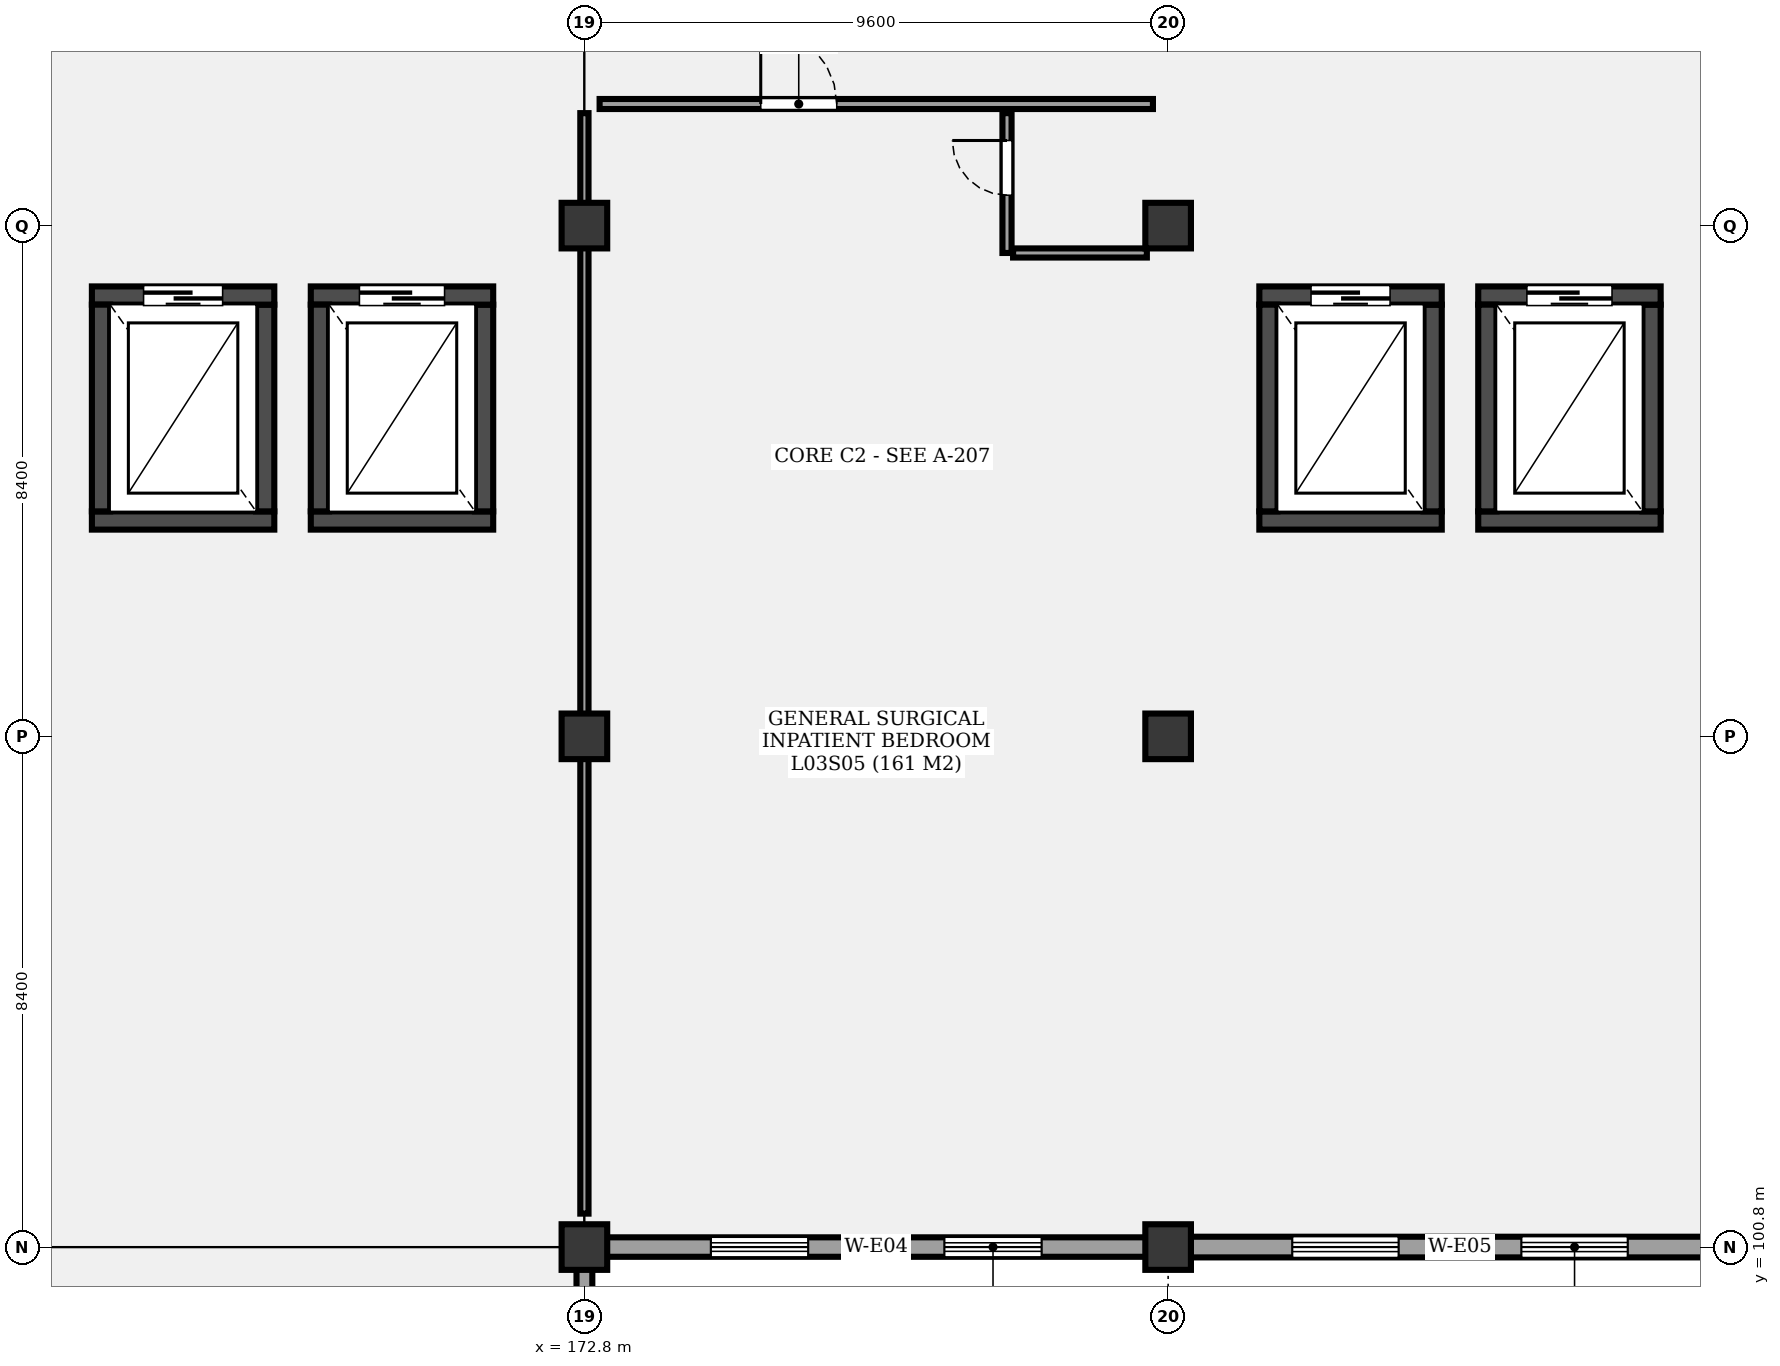
"""IFC4 building model, lengths in metres.
Left out: names, types, materials, properties, quantities, classifications, styles, units other than length and angle.
Written with IfcOpenShell. Run it as: python <this file> out.ifc"""

import sys

from ifc_helpers import new_model, si_unit, direction, frame, frame_2d, origin, origin_2d, place, context, subcontext, project, spatial, rectangle, extrude, element, fill, save


model = new_model("IFC4")
c1 = context("Model", 3, precision=1e-05, world=origin(), true_north=direction((0.0, 1.0)))
c2 = subcontext(c1, "Body", "Model", "MODEL_VIEW")
j1 = project(units=[si_unit("LENGTHUNIT", "METRE"), si_unit("PLANEANGLEUNIT", "RADIAN")], contexts=[c1])
p1 = place(None, origin())
s1 = spatial("IfcSite", under=j1, at=p1, CompositionType="ELEMENT")
p2 = place(p1, origin())
s2 = spatial("IfcBuilding", under=s1, at=p2, CompositionType="ELEMENT")
p3 = place(p2, frame((0.0, 0.0, 13.5)))
s3 = spatial("IfcBuildingStorey", under=s2, at=p3, CompositionType="ELEMENT", Elevation=13.5)
for number, where, z_axis, x_axis in (
    (1, (172.8, 100.8, 0.0), (0.0, 0.0, 1.0), (1.0, 0.0, 0.0)),
    (2, (172.8, 109.2, 0.0), (0.0, 0.0, 1.0), (1.0, 0.0, 0.0)),
    (3, (172.8, 117.6, 0.0), (0.0, 0.0, 1.0), (1.0, 0.0, 0.0)),
    (4, (182.4, 100.8, 0.0), (0.0, 0.0, 1.0), (1.0, 0.0, 0.0)),
    (5, (182.4, 109.2, 0.0), (0.0, 0.0, 1.0), (1.0, 0.0, 0.0)),
    (6, (182.4, 117.6, 0.0), (0.0, 0.0, 1.0), (1.0, 0.0, 0.0)),
):
    element("IfcColumn", number, at=place(p3, frame(where, z_axis=z_axis, x_axis=x_axis)), inside=s3, PredefinedType="COLUMN", context=c2, shape_type="SweptSolid", body=[
        extrude(rectangle(XDim=0.75, YDim=0.75, at=origin_2d()), origin(), (0.0, 0.0, 1.0), 4.3),
    ])
p4 = place(p3, frame((164.7, 112.75, 0.0), z_axis=(0.0, 0.0, 1.0), x_axis=(1.0, 0.0, 0.0)))
e7 = element("IfcWall", 7, at=p4, inside=s3, PredefinedType="SHEAR", context=c2, shape_type="SweptSolid", body=[
    extrude(rectangle(XDim=3.0, YDim=0.3, at=frame_2d((1.5, 0.0))), origin(), (0.0, 0.0, 1.0), 4.3),
])
p5 = place(p3, frame((167.55, 112.9, 0.0), z_axis=(0.0, 0.0, 1.0), x_axis=(0.0, 1.0, 0.0)))
e8 = element("IfcWall", 8, at=p5, inside=s3, PredefinedType="SHEAR", context=c2, shape_type="SweptSolid", body=[
    extrude(rectangle(XDim=3.4, YDim=0.3, at=frame_2d((1.7, 0.0))), origin(), (0.0, 0.0, 1.0), 4.3),
])
p6 = place(p3, frame((167.7, 116.45, 0.0), z_axis=(0.0, 0.0, 1.0), x_axis=(-1.0, 0.0, 0.0)))
e9 = element("IfcWall", 9, at=p6, inside=s3, PredefinedType="SHEAR", context=c2, shape_type="SweptSolid", body=[
    extrude(rectangle(XDim=3.0, YDim=0.3, at=frame_2d((1.5, 0.0))), origin(), (0.0, 0.0, 1.0), 4.3),
])
p7 = place(p6, frame((0.85, 0.0, 0.0)))
e10 = element("IfcOpeningElement", 10, at=p7, cuts=e9, PredefinedType="OPENING", context=c2, shape_type="SweptSolid", body=[
    extrude(rectangle(XDim=1.3, YDim=2.3, at=frame_2d((0.65, 1.15))), frame((0.0, 0.16, 0.0), z_axis=(0.0, -1.0, 0.0), x_axis=(1.0, 0.0, 0.0)), (0.0, 0.0, 1.0), 0.32),
])
p8 = place(p3, frame((164.85, 116.3, 0.0), z_axis=(0.0, 0.0, 1.0), x_axis=(0.0, -1.0, 0.0)))
e11 = element("IfcWall", 11, at=p8, inside=s3, PredefinedType="SHEAR", context=c2, shape_type="SweptSolid", body=[
    extrude(rectangle(XDim=3.4, YDim=0.3, at=frame_2d((1.7, 0.0))), origin(), (0.0, 0.0, 1.0), 4.3),
])
p9 = place(p3, frame((168.3, 112.75, 0.0), z_axis=(0.0, 0.0, 1.0), x_axis=(1.0, 0.0, 0.0)))
e12 = element("IfcWall", 12, at=p9, inside=s3, PredefinedType="SHEAR", context=c2, shape_type="SweptSolid", body=[
    extrude(rectangle(XDim=3.0, YDim=0.3, at=frame_2d((1.5, 0.0))), origin(), (0.0, 0.0, 1.0), 4.3),
])
p10 = place(p3, frame((171.15, 112.9, 0.0), z_axis=(0.0, 0.0, 1.0), x_axis=(0.0, 1.0, 0.0)))
e13 = element("IfcWall", 13, at=p10, inside=s3, PredefinedType="SHEAR", context=c2, shape_type="SweptSolid", body=[
    extrude(rectangle(XDim=3.4, YDim=0.3, at=frame_2d((1.7, 0.0))), origin(), (0.0, 0.0, 1.0), 4.3),
])
p11 = place(p3, frame((171.3, 116.45, 0.0), z_axis=(0.0, 0.0, 1.0), x_axis=(-1.0, 0.0, 0.0)))
e14 = element("IfcWall", 14, at=p11, inside=s3, PredefinedType="SHEAR", context=c2, shape_type="SweptSolid", body=[
    extrude(rectangle(XDim=3.0, YDim=0.3, at=frame_2d((1.5, 0.0))), origin(), (0.0, 0.0, 1.0), 4.3),
])
p12 = place(p11, frame((0.8, 0.0, 0.0)))
e15 = element("IfcOpeningElement", 15, at=p12, cuts=e14, PredefinedType="OPENING", context=c2, shape_type="SweptSolid", body=[
    extrude(rectangle(XDim=1.4, YDim=2.3, at=frame_2d((0.7, 1.15))), frame((0.0, 0.16, 0.0), z_axis=(0.0, -1.0, 0.0), x_axis=(1.0, 0.0, 0.0)), (0.0, 0.0, 1.0), 0.32),
])
p13 = place(p3, frame((168.45, 116.3, 0.0), z_axis=(0.0, 0.0, 1.0), x_axis=(0.0, -1.0, 0.0)))
e16 = element("IfcWall", 16, at=p13, inside=s3, PredefinedType="SHEAR", context=c2, shape_type="SweptSolid", body=[
    extrude(rectangle(XDim=3.4, YDim=0.3, at=frame_2d((1.7, 0.0))), origin(), (0.0, 0.0, 1.0), 4.3),
])
p14 = place(p3, frame((183.9, 112.75, 0.0), z_axis=(0.0, 0.0, 1.0), x_axis=(1.0, 0.0, 0.0)))
e17 = element("IfcWall", 17, at=p14, inside=s3, PredefinedType="SHEAR", context=c2, shape_type="SweptSolid", body=[
    extrude(rectangle(XDim=3.0, YDim=0.3, at=frame_2d((1.5, 0.0))), origin(), (0.0, 0.0, 1.0), 4.3),
])
p15 = place(p3, frame((186.75, 112.9, 0.0), z_axis=(0.0, 0.0, 1.0), x_axis=(0.0, 1.0, 0.0)))
e18 = element("IfcWall", 18, at=p15, inside=s3, PredefinedType="SHEAR", context=c2, shape_type="SweptSolid", body=[
    extrude(rectangle(XDim=3.4, YDim=0.3, at=frame_2d((1.7, 0.0))), origin(), (0.0, 0.0, 1.0), 4.3),
])
p16 = place(p3, frame((186.9, 116.45, 0.0), z_axis=(0.0, 0.0, 1.0), x_axis=(-1.0, 0.0, 0.0)))
e19 = element("IfcWall", 19, at=p16, inside=s3, PredefinedType="SHEAR", context=c2, shape_type="SweptSolid", body=[
    extrude(rectangle(XDim=3.0, YDim=0.3, at=frame_2d((1.5, 0.0))), origin(), (0.0, 0.0, 1.0), 4.3),
])
p17 = place(p16, frame((0.85, 0.0, 0.0)))
e20 = element("IfcOpeningElement", 20, at=p17, cuts=e19, PredefinedType="OPENING", context=c2, shape_type="SweptSolid", body=[
    extrude(rectangle(XDim=1.3, YDim=2.3, at=frame_2d((0.65, 1.15))), frame((0.0, 0.16, 0.0), z_axis=(0.0, -1.0, 0.0), x_axis=(1.0, 0.0, 0.0)), (0.0, 0.0, 1.0), 0.32),
])
p18 = place(p3, frame((184.05, 116.3, 0.0), z_axis=(0.0, 0.0, 1.0), x_axis=(0.0, -1.0, 0.0)))
e21 = element("IfcWall", 21, at=p18, inside=s3, PredefinedType="SHEAR", context=c2, shape_type="SweptSolid", body=[
    extrude(rectangle(XDim=3.4, YDim=0.3, at=frame_2d((1.7, 0.0))), origin(), (0.0, 0.0, 1.0), 4.3),
])
p19 = place(p3, frame((187.5, 112.75, 0.0), z_axis=(0.0, 0.0, 1.0), x_axis=(1.0, 0.0, 0.0)))
e22 = element("IfcWall", 22, at=p19, inside=s3, PredefinedType="SHEAR", context=c2, shape_type="SweptSolid", body=[
    extrude(rectangle(XDim=3.0, YDim=0.3, at=frame_2d((1.5, 0.0))), origin(), (0.0, 0.0, 1.0), 4.3),
])
p20 = place(p3, frame((190.35, 112.9, 0.0), z_axis=(0.0, 0.0, 1.0), x_axis=(0.0, 1.0, 0.0)))
e23 = element("IfcWall", 23, at=p20, inside=s3, PredefinedType="SHEAR", context=c2, shape_type="SweptSolid", body=[
    extrude(rectangle(XDim=3.4, YDim=0.3, at=frame_2d((1.7, 0.0))), origin(), (0.0, 0.0, 1.0), 4.3),
])
p21 = place(p3, frame((190.5, 116.45, 0.0), z_axis=(0.0, 0.0, 1.0), x_axis=(-1.0, 0.0, 0.0)))
e24 = element("IfcWall", 24, at=p21, inside=s3, PredefinedType="SHEAR", context=c2, shape_type="SweptSolid", body=[
    extrude(rectangle(XDim=3.0, YDim=0.3, at=frame_2d((1.5, 0.0))), origin(), (0.0, 0.0, 1.0), 4.3),
])
p22 = place(p21, frame((0.8, 0.0, 0.0)))
e25 = element("IfcOpeningElement", 25, at=p22, cuts=e24, PredefinedType="OPENING", context=c2, shape_type="SweptSolid", body=[
    extrude(rectangle(XDim=1.4, YDim=2.3, at=frame_2d((0.7, 1.15))), frame((0.0, 0.16, 0.0), z_axis=(0.0, -1.0, 0.0), x_axis=(1.0, 0.0, 0.0)), (0.0, 0.0, 1.0), 0.32),
])
p23 = place(p3, frame((187.65, 116.3, 0.0), z_axis=(0.0, 0.0, 1.0), x_axis=(0.0, -1.0, 0.0)))
e26 = element("IfcWall", 26, at=p23, inside=s3, PredefinedType="SHEAR", context=c2, shape_type="SweptSolid", body=[
    extrude(rectangle(XDim=3.4, YDim=0.3, at=frame_2d((1.7, 0.0))), origin(), (0.0, 0.0, 1.0), 4.3),
])
p24 = place(p3, frame((182.4, 100.8, 0.0), z_axis=(0.0, 0.0, 1.0), x_axis=(-1.0, 0.0, 0.0)))
e27 = element("IfcWall", 27, at=p24, inside=s3, PredefinedType="SOLIDWALL", context=c2, shape_type="SweptSolid", body=[
    extrude(rectangle(XDim=9.6, YDim=0.32, at=frame_2d((4.8, 0.0))), origin(), (0.0, 0.0, 1.0), 3.49),
])
p25 = place(p24, frame((2.08, 0.0, 0.85)))
e28 = element("IfcOpeningElement", 28, at=p25, cuts=e27, PredefinedType="OPENING", context=c2, shape_type="SweptSolid", body=[
    extrude(rectangle(XDim=1.6, YDim=1.2, at=frame_2d((0.8, 0.6))), frame((0.0, 0.17, 0.0), z_axis=(0.0, -1.0, 0.0), x_axis=(1.0, 0.0, 0.0)), (0.0, 0.0, 1.0), 0.34),
])
p26 = place(p24, frame((5.92, 0.0, 0.85)))
e29 = element("IfcOpeningElement", 29, at=p26, cuts=e27, PredefinedType="OPENING", context=c2, shape_type="SweptSolid", body=[
    extrude(rectangle(XDim=1.6, YDim=1.2, at=frame_2d((0.8, 0.6))), frame((0.0, 0.17, 0.0), z_axis=(0.0, -1.0, 0.0), x_axis=(1.0, 0.0, 0.0)), (0.0, 0.0, 1.0), 0.34),
])
p27 = place(p3, frame((192.0, 100.8, 0.0), z_axis=(0.0, 0.0, 1.0), x_axis=(-1.0, 0.0, 0.0)))
e30 = element("IfcWall", 30, at=p27, inside=s3, PredefinedType="SOLIDWALL", context=c2, shape_type="SweptSolid", body=[
    extrude(rectangle(XDim=9.6, YDim=0.34, at=frame_2d((4.8, 0.0))), origin(), (0.0, 0.0, 1.0), 3.49),
])
p28 = place(p27, frame((2.041, 0.0, 0.85)))
e31 = element("IfcOpeningElement", 31, at=p28, cuts=e30, PredefinedType="OPENING", context=c2, shape_type="SweptSolid", body=[
    extrude(rectangle(XDim=1.75, YDim=1.2, at=frame_2d((0.875, 0.6))), frame((0.0, 0.18, 0.0), z_axis=(0.0, -1.0, 0.0), x_axis=(1.0, 0.0, 0.0)), (0.0, 0.0, 1.0), 0.36),
])
p29 = place(p27, frame((5.809, 0.0, 0.85)))
e32 = element("IfcOpeningElement", 32, at=p29, cuts=e30, PredefinedType="OPENING", context=c2, shape_type="SweptSolid", body=[
    extrude(rectangle(XDim=1.75, YDim=1.2, at=frame_2d((0.875, 0.6))), frame((0.0, 0.18, 0.0), z_axis=(0.0, -1.0, 0.0), x_axis=(1.0, 0.0, 0.0)), (0.0, 0.0, 1.0), 0.36),
])
p30 = place(p3, frame((172.8, 100.64, 0.0), z_axis=(0.0, 0.0, 1.0), x_axis=(0.0, -1.0, 0.0)))
e33 = element("IfcWall", 33, at=p30, inside=s3, PredefinedType="SOLIDWALL", context=c2, shape_type="SweptSolid", body=[
    extrude(rectangle(XDim=8.24, YDim=0.26, at=frame_2d((4.12, 0.0))), origin(), (0.0, 0.0, 1.0), 3.49),
])
p31 = place(p30, frame((3.095, 0.0, 0.85)))
e34 = element("IfcOpeningElement", 34, at=p31, cuts=e33, PredefinedType="OPENING", context=c2, shape_type="SweptSolid", body=[
    extrude(rectangle(XDim=2.05, YDim=1.2, at=frame_2d((1.025, 0.6))), frame((0.0, 0.14, 0.0), z_axis=(0.0, -1.0, 0.0), x_axis=(1.0, 0.0, 0.0)), (0.0, 0.0, 1.0), 0.28),
])
p32 = place(p3, frame((173.05, 119.6, 0.0), z_axis=(0.0, 0.0, 1.0), x_axis=(1.0, 0.0, 0.0)))
e35 = element("IfcWall", 35, at=p32, inside=s3, PredefinedType="PARTITIONING", context=c2, shape_type="SweptSolid", body=[
    extrude(rectangle(XDim=9.1, YDim=0.165, at=frame_2d((4.55, 0.0))), origin(), (0.0, 0.0, 1.0), 3.4),
])
p33 = place(p32, frame((2.65, 0.0, 0.0)))
e36 = element("IfcOpeningElement", 36, at=p33, cuts=e35, PredefinedType="OPENING", context=c2, shape_type="SweptSolid", body=[
    extrude(rectangle(XDim=1.25, YDim=2.2, at=frame_2d((0.625, 1.1))), frame((0.0, 0.093, 0.0), z_axis=(0.0, -1.0, 0.0), x_axis=(1.0, 0.0, 0.0)), (0.0, 0.0, 1.0), 0.185),
])
p34 = place(p3, frame((179.75, 117.15, 0.0), z_axis=(0.0, 0.0, 1.0), x_axis=(0.0, 1.0, 0.0)))
e37 = element("IfcWall", 37, at=p34, inside=s3, PredefinedType="PARTITIONING", context=c2, shape_type="SweptSolid", body=[
    extrude(rectangle(XDim=2.3, YDim=0.15, at=frame_2d((1.15, 0.0))), origin(), (0.0, 0.0, 1.0), 3.4),
])
p35 = place(p34, frame((0.95, 0.0, 0.0)))
e38 = element("IfcOpeningElement", 38, at=p35, cuts=e37, PredefinedType="OPENING", context=c2, shape_type="SweptSolid", body=[
    extrude(rectangle(XDim=0.9, YDim=2.1, at=frame_2d((0.45, 1.05))), frame((0.0, 0.085, 0.0), z_axis=(0.0, -1.0, 0.0), x_axis=(1.0, 0.0, 0.0)), (0.0, 0.0, 1.0), 0.17),
])
p36 = place(p3, frame((179.85, 117.15, 0.0), z_axis=(0.0, 0.0, 1.0), x_axis=(1.0, 0.0, 0.0)))
e39 = element("IfcWall", 39, at=p36, inside=s3, PredefinedType="PARTITIONING", context=c2, shape_type="SweptSolid", body=[
    extrude(rectangle(XDim=2.2, YDim=0.15, at=frame_2d((1.1, 0.0))), origin(), (0.0, 0.0, 1.0), 3.4),
])
p37 = place(p3, frame((172.8, 101.35, 0.0), z_axis=(0.0, 0.0, 1.0), x_axis=(0.0, 1.0, 0.0)))
e40 = element("IfcWall", 40, at=p37, inside=s3, PredefinedType="PARTITIONING", context=c2, shape_type="SweptSolid", body=[
    extrude(rectangle(XDim=18.1, YDim=0.135, at=frame_2d((9.05, 0.0))), origin(), (0.0, 0.0, 1.0), 3.4),
])
p38 = place(p7, origin())
e41 = element("IfcDoor", 41, at=p38, inside=s3, OperationType="SLIDING_TO_RIGHT", PredefinedType="DOOR", context=c2, shape_type="SweptSolid", body=[
    extrude(rectangle(XDim=1.3, YDim=2.3, at=frame_2d((0.65, 1.15))), frame((0.0, 0.025, 0.0), z_axis=(0.0, -1.0, 0.0), x_axis=(1.0, 0.0, 0.0)), (0.0, 0.0, 1.0), 0.05),
])
fill(e10, e41)
p39 = place(p12, origin())
e42 = element("IfcDoor", 42, at=p39, inside=s3, OperationType="SLIDING_TO_LEFT", PredefinedType="DOOR", context=c2, shape_type="SweptSolid", body=[
    extrude(rectangle(XDim=1.4, YDim=2.3, at=frame_2d((0.7, 1.15))), frame((0.0, 0.025, 0.0), z_axis=(0.0, -1.0, 0.0), x_axis=(1.0, 0.0, 0.0)), (0.0, 0.0, 1.0), 0.05),
])
fill(e15, e42)
p40 = place(p17, origin())
e43 = element("IfcDoor", 43, at=p40, inside=s3, OperationType="SLIDING_TO_RIGHT", PredefinedType="DOOR", context=c2, shape_type="SweptSolid", body=[
    extrude(rectangle(XDim=1.3, YDim=2.3, at=frame_2d((0.65, 1.15))), frame((0.0, 0.025, 0.0), z_axis=(0.0, -1.0, 0.0), x_axis=(1.0, 0.0, 0.0)), (0.0, 0.0, 1.0), 0.05),
])
fill(e20, e43)
p41 = place(p22, origin())
e44 = element("IfcDoor", 44, at=p41, inside=s3, OperationType="SLIDING_TO_RIGHT", PredefinedType="DOOR", context=c2, shape_type="SweptSolid", body=[
    extrude(rectangle(XDim=1.4, YDim=2.3, at=frame_2d((0.7, 1.15))), frame((0.0, 0.025, 0.0), z_axis=(0.0, -1.0, 0.0), x_axis=(1.0, 0.0, 0.0)), (0.0, 0.0, 1.0), 0.05),
])
fill(e25, e44)
p42 = place(p25, origin())
e45 = element("IfcWindow", 45, at=p42, inside=s3, PartitioningType="SINGLE_PANEL", PredefinedType="WINDOW", context=c2, shape_type="SweptSolid", body=[
    extrude(rectangle(XDim=1.6, YDim=1.2, at=frame_2d((0.8, 0.6))), frame((0.0, 0.03, 0.0), z_axis=(0.0, -1.0, 0.0), x_axis=(1.0, 0.0, 0.0)), (0.0, 0.0, 1.0), 0.06),
])
fill(e28, e45)
p43 = place(p26, origin())
e46 = element("IfcWindow", 46, at=p43, inside=s3, PartitioningType="SINGLE_PANEL", PredefinedType="WINDOW", context=c2, shape_type="SweptSolid", body=[
    extrude(rectangle(XDim=1.6, YDim=1.2, at=frame_2d((0.8, 0.6))), frame((0.0, 0.03, 0.0), z_axis=(0.0, -1.0, 0.0), x_axis=(1.0, 0.0, 0.0)), (0.0, 0.0, 1.0), 0.06),
])
fill(e29, e46)
p44 = place(p28, origin())
e47 = element("IfcWindow", 47, at=p44, inside=s3, PartitioningType="SINGLE_PANEL", PredefinedType="WINDOW", context=c2, shape_type="SweptSolid", body=[
    extrude(rectangle(XDim=1.75, YDim=1.2, at=frame_2d((0.875, 0.6))), frame((0.0, 0.03, 0.0), z_axis=(0.0, -1.0, 0.0), x_axis=(1.0, 0.0, 0.0)), (0.0, 0.0, 1.0), 0.06),
])
fill(e31, e47)
p45 = place(p29, origin())
e48 = element("IfcWindow", 48, at=p45, inside=s3, PartitioningType="SINGLE_PANEL", PredefinedType="WINDOW", context=c2, shape_type="SweptSolid", body=[
    extrude(rectangle(XDim=1.75, YDim=1.2, at=frame_2d((0.875, 0.6))), frame((0.0, 0.03, 0.0), z_axis=(0.0, -1.0, 0.0), x_axis=(1.0, 0.0, 0.0)), (0.0, 0.0, 1.0), 0.06),
])
fill(e32, e48)
p46 = place(p33, origin())
e49 = element("IfcDoor", 49, at=p46, inside=s3, OperationType="SINGLE_SWING_LEFT", PredefinedType="DOOR", context=c2, shape_type="SweptSolid", body=[
    extrude(rectangle(XDim=1.25, YDim=2.2, at=frame_2d((0.625, 1.1))), frame((0.0, 0.025, 0.0), z_axis=(0.0, -1.0, 0.0), x_axis=(1.0, 0.0, 0.0)), (0.0, 0.0, 1.0), 0.05),
])
fill(e36, e49)
p47 = place(p35, origin())
e50 = element("IfcDoor", 50, at=p47, inside=s3, OperationType="SINGLE_SWING_RIGHT", PredefinedType="DOOR", context=c2, shape_type="SweptSolid", body=[
    extrude(rectangle(XDim=0.9, YDim=2.1, at=frame_2d((0.45, 1.05))), frame((0.0, 0.025, 0.0), z_axis=(0.0, -1.0, 0.0), x_axis=(1.0, 0.0, 0.0)), (0.0, 0.0, 1.0), 0.05),
])
fill(e38, e50)
save(model, sys.argv[1])
